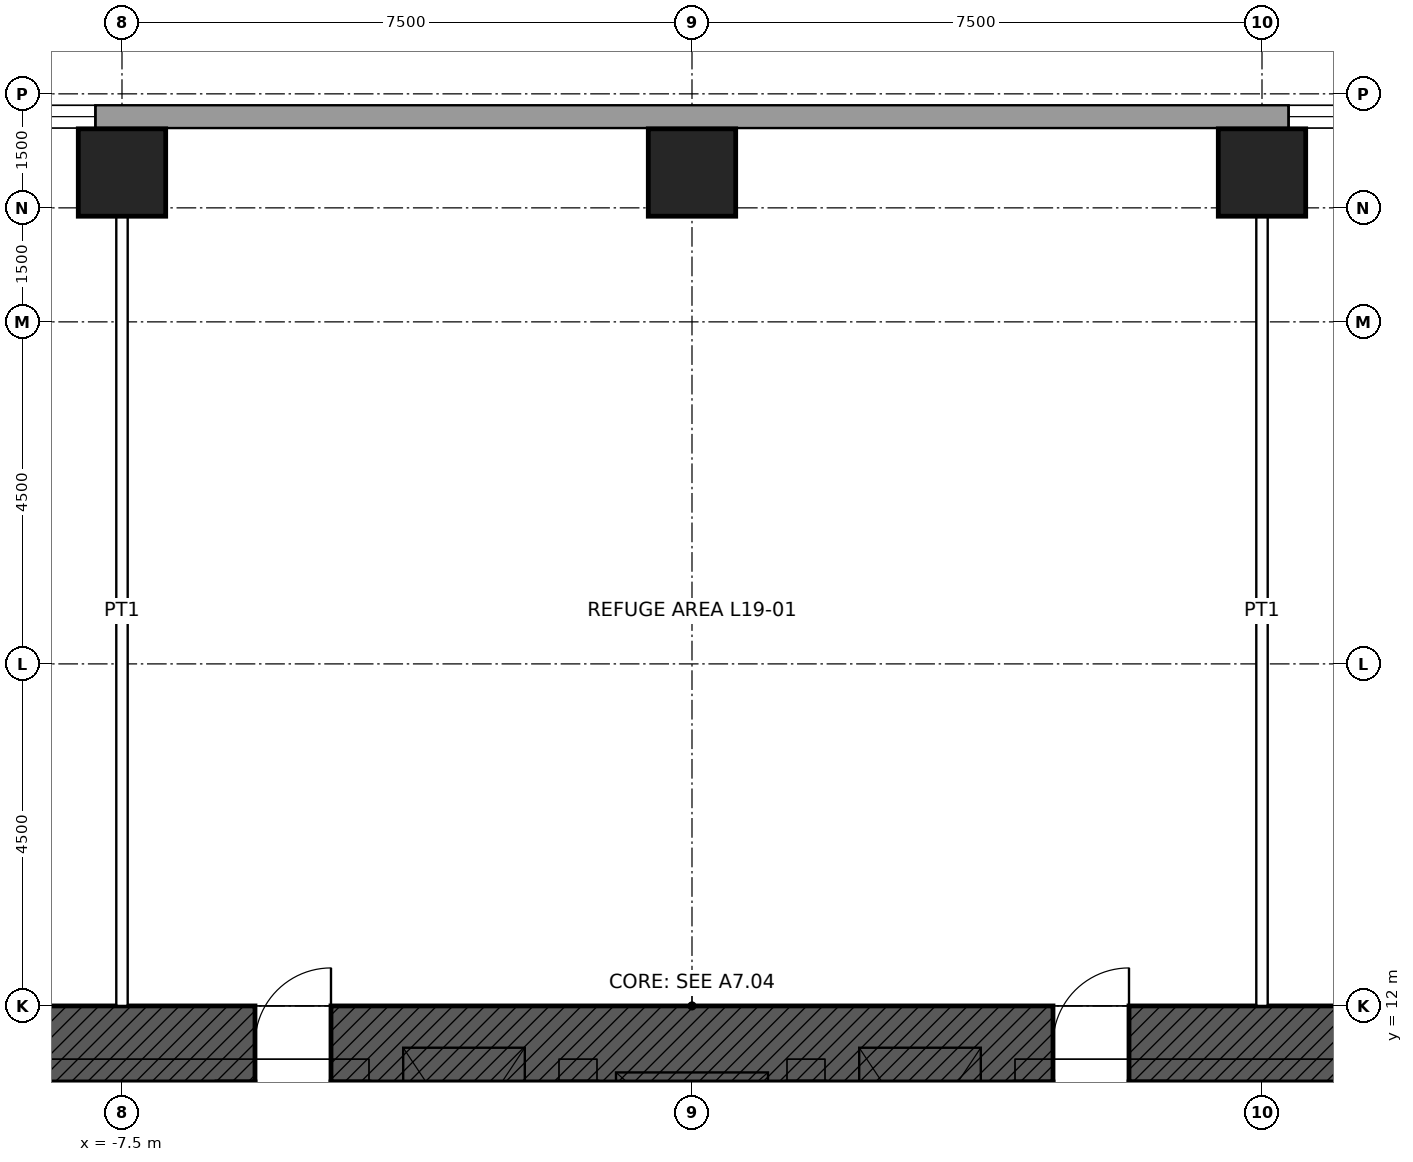
"""IFC4 building model, lengths in metres.
Left out: names, types, materials, properties, quantities, classifications, styles, units other than length and angle.
Written with IfcOpenShell. Run it as: python <this file> out.ifc"""

import sys

from ifc_helpers import new_model, si_unit, direction, frame, frame_2d, origin, origin_2d, place, context, subcontext, project, spatial, rectangle, hollow_rectangle, extrude, element, fill, save


model = new_model("IFC4")
c1 = context("Model", 3, precision=1e-05, world=origin(), true_north=direction((0.0, 1.0)))
c2 = subcontext(c1, "Body", "Model", "MODEL_VIEW")
j1 = project(units=[si_unit("LENGTHUNIT", "METRE"), si_unit("PLANEANGLEUNIT", "RADIAN")], contexts=[c1])
p1 = place(None, origin())
s1 = spatial("IfcSite", under=j1, at=p1, CompositionType="ELEMENT")
p2 = place(p1, origin())
s2 = spatial("IfcBuilding", under=s1, at=p2, CompositionType="ELEMENT")
p3 = place(p2, frame((0.0, 0.0, 98.4)))
s3 = spatial("IfcBuildingStorey", under=s2, at=p3, CompositionType="ELEMENT", Elevation=98.4)
p4 = place(p3, frame((-12.0, 11.5, 0.0), z_axis=(0.0, 0.0, 1.0), x_axis=(1.0, 0.0, 0.0)))
e1 = element("IfcWall", 1, at=p4, inside=s3, PredefinedType="SHEAR", context=c2, shape_type="SweptSolid", body=[
    extrude(rectangle(XDim=24.0, YDim=1.0, at=frame_2d((12.0, 0.0))), origin(), (0.0, 0.0, 1.0), 6.0),
])
p5 = place(p4, frame((6.25, 0.0, 0.0)))
e2 = element("IfcOpeningElement", 2, at=p5, cuts=e1, PredefinedType="OPENING", context=c2, shape_type="SweptSolid", body=[
    extrude(rectangle(XDim=1.0, YDim=2.4, at=frame_2d((0.5, 1.2))), frame((0.0, 0.51, 0.0), z_axis=(0.0, -1.0, 0.0), x_axis=(1.0, 0.0, 0.0)), (0.0, 0.0, 1.0), 1.02),
])
p6 = place(p4, frame((16.75, 0.0, 0.0)))
e3 = element("IfcOpeningElement", 3, at=p6, cuts=e1, PredefinedType="OPENING", context=c2, shape_type="SweptSolid", body=[
    extrude(rectangle(XDim=1.0, YDim=2.4, at=frame_2d((0.5, 1.2))), frame((0.0, 0.51, 0.0), z_axis=(0.0, -1.0, 0.0), x_axis=(1.0, 0.0, 0.0)), (0.0, 0.0, 1.0), 1.02),
])
for number, where, z_axis, x_axis in (
    (4, (-7.5, 22.965, -0.25), (0.0, 0.0, 1.0), (1.0, 0.0, 0.0)),
    (5, (0.0, 22.965, -0.25), (0.0, 0.0, 1.0), (1.0, 0.0, 0.0)),
    (6, (7.5, 22.965, -0.25), (0.0, 0.0, 1.0), (1.0, 0.0, 0.0)),
):
    element("IfcColumn", number, at=place(p3, frame(where, z_axis=z_axis, x_axis=x_axis)), inside=s3, PredefinedType="COLUMN", context=c2, shape_type="SweptSolid", body=[
        extrude(hollow_rectangle(XDim=1.15, YDim=1.15, WallThickness=0.075, at=origin_2d()), origin(), (0.0, 0.0, 1.0), 6.25),
    ])
p7 = place(p3, frame((-16.2, 23.7, 0.0), z_axis=(0.0, 0.0, 1.0), x_axis=(1.0, 0.0, 0.0)))
e7 = element("IfcWall", 7, at=p7, inside=s3, PredefinedType="SOLIDWALL", context=c2, shape_type="SweptSolid", body=[
    extrude(rectangle(XDim=32.4, YDim=0.3, at=frame_2d((16.2, 0.0))), origin(), (0.0, 0.0, 1.0), 5.8),
])
p8 = place(p7, frame((3.25, 0.0, 1.5)))
e8 = element("IfcOpeningElement", 8, at=p8, cuts=e7, PredefinedType="OPENING", context=c2, shape_type="SweptSolid", body=[
    extrude(rectangle(XDim=2.4, YDim=2.4, at=frame_2d((1.2, 1.2))), frame((0.0, 0.16, 0.0), z_axis=(0.0, -1.0, 0.0), x_axis=(1.0, 0.0, 0.0)), (0.0, 0.0, 1.0), 0.32),
])
p9 = place(p7, frame((5.95, 0.0, 1.5)))
e9 = element("IfcOpeningElement", 9, at=p9, cuts=e7, PredefinedType="OPENING", context=c2, shape_type="SweptSolid", body=[
    extrude(rectangle(XDim=2.4, YDim=2.4, at=frame_2d((1.2, 1.2))), frame((0.0, 0.16, 0.0), z_axis=(0.0, -1.0, 0.0), x_axis=(1.0, 0.0, 0.0)), (0.0, 0.0, 1.0), 0.32),
])
p10 = place(p7, frame((24.05, 0.0, 1.5)))
e10 = element("IfcOpeningElement", 10, at=p10, cuts=e7, PredefinedType="OPENING", context=c2, shape_type="SweptSolid", body=[
    extrude(rectangle(XDim=2.4, YDim=2.4, at=frame_2d((1.2, 1.2))), frame((0.0, 0.16, 0.0), z_axis=(0.0, -1.0, 0.0), x_axis=(1.0, 0.0, 0.0)), (0.0, 0.0, 1.0), 0.32),
])
p11 = place(p7, frame((26.75, 0.0, 1.5)))
e11 = element("IfcOpeningElement", 11, at=p11, cuts=e7, PredefinedType="OPENING", context=c2, shape_type="SweptSolid", body=[
    extrude(rectangle(XDim=2.4, YDim=2.4, at=frame_2d((1.2, 1.2))), frame((0.0, 0.16, 0.0), z_axis=(0.0, -1.0, 0.0), x_axis=(1.0, 0.0, 0.0)), (0.0, 0.0, 1.0), 0.32),
])
for number, where, z_axis, x_axis in (
    (12, (-7.5, 12.0, 0.0), (0.0, 0.0, 1.0), (0.0, 1.0, 0.0)),
    (13, (7.5, 12.0, 0.0), (0.0, 0.0, 1.0), (0.0, 1.0, 0.0)),
):
    element("IfcWall", number, at=place(p3, frame(where, z_axis=z_axis, x_axis=x_axis)), inside=s3, PredefinedType="PARTITIONING", context=c2, shape_type="SweptSolid", body=[
        extrude(rectangle(XDim=10.39, YDim=0.15, at=frame_2d((5.195, 0.0))), origin(), (0.0, 0.0, 1.0), 5.8),
    ])
p12 = place(p9, origin())
e14 = element("IfcWindow", 14, at=p12, inside=s3, PartitioningType="SINGLE_PANEL", PredefinedType="WINDOW", context=c2, shape_type="SweptSolid", body=[
    extrude(rectangle(XDim=2.4, YDim=2.4, at=frame_2d((1.2, 1.2))), frame((0.0, 0.15, 0.0), z_axis=(0.0, -1.0, 0.0), x_axis=(1.0, 0.0, 0.0)), (0.0, 0.0, 1.0), 0.06),
])
fill(e9, e14)
p13 = place(p10, origin())
e15 = element("IfcWindow", 15, at=p13, inside=s3, PartitioningType="SINGLE_PANEL", PredefinedType="WINDOW", context=c2, shape_type="SweptSolid", body=[
    extrude(rectangle(XDim=2.4, YDim=2.4, at=frame_2d((1.2, 1.2))), frame((0.0, 0.15, 0.0), z_axis=(0.0, -1.0, 0.0), x_axis=(1.0, 0.0, 0.0)), (0.0, 0.0, 1.0), 0.06),
])
fill(e10, e15)
p14 = place(p5, origin())
e16 = element("IfcDoor", 16, at=p14, inside=s3, OperationType="SINGLE_SWING_RIGHT", PredefinedType="DOOR", context=c2, shape_type="SweptSolid", body=[
    extrude(rectangle(XDim=1.0, YDim=2.4, at=frame_2d((0.5, 1.2))), frame((0.0, 0.485, 0.0), z_axis=(0.0, -1.0, 0.0), x_axis=(1.0, 0.0, 0.0)), (0.0, 0.0, 1.0), 0.05),
])
fill(e2, e16)
p15 = place(p6, origin())
e17 = element("IfcDoor", 17, at=p15, inside=s3, OperationType="SINGLE_SWING_RIGHT", PredefinedType="DOOR", context=c2, shape_type="SweptSolid", body=[
    extrude(rectangle(XDim=1.0, YDim=2.4, at=frame_2d((0.5, 1.2))), frame((0.0, 0.485, 0.0), z_axis=(0.0, -1.0, 0.0), x_axis=(1.0, 0.0, 0.0)), (0.0, 0.0, 1.0), 0.05),
])
fill(e3, e17)
save(model, sys.argv[1])
